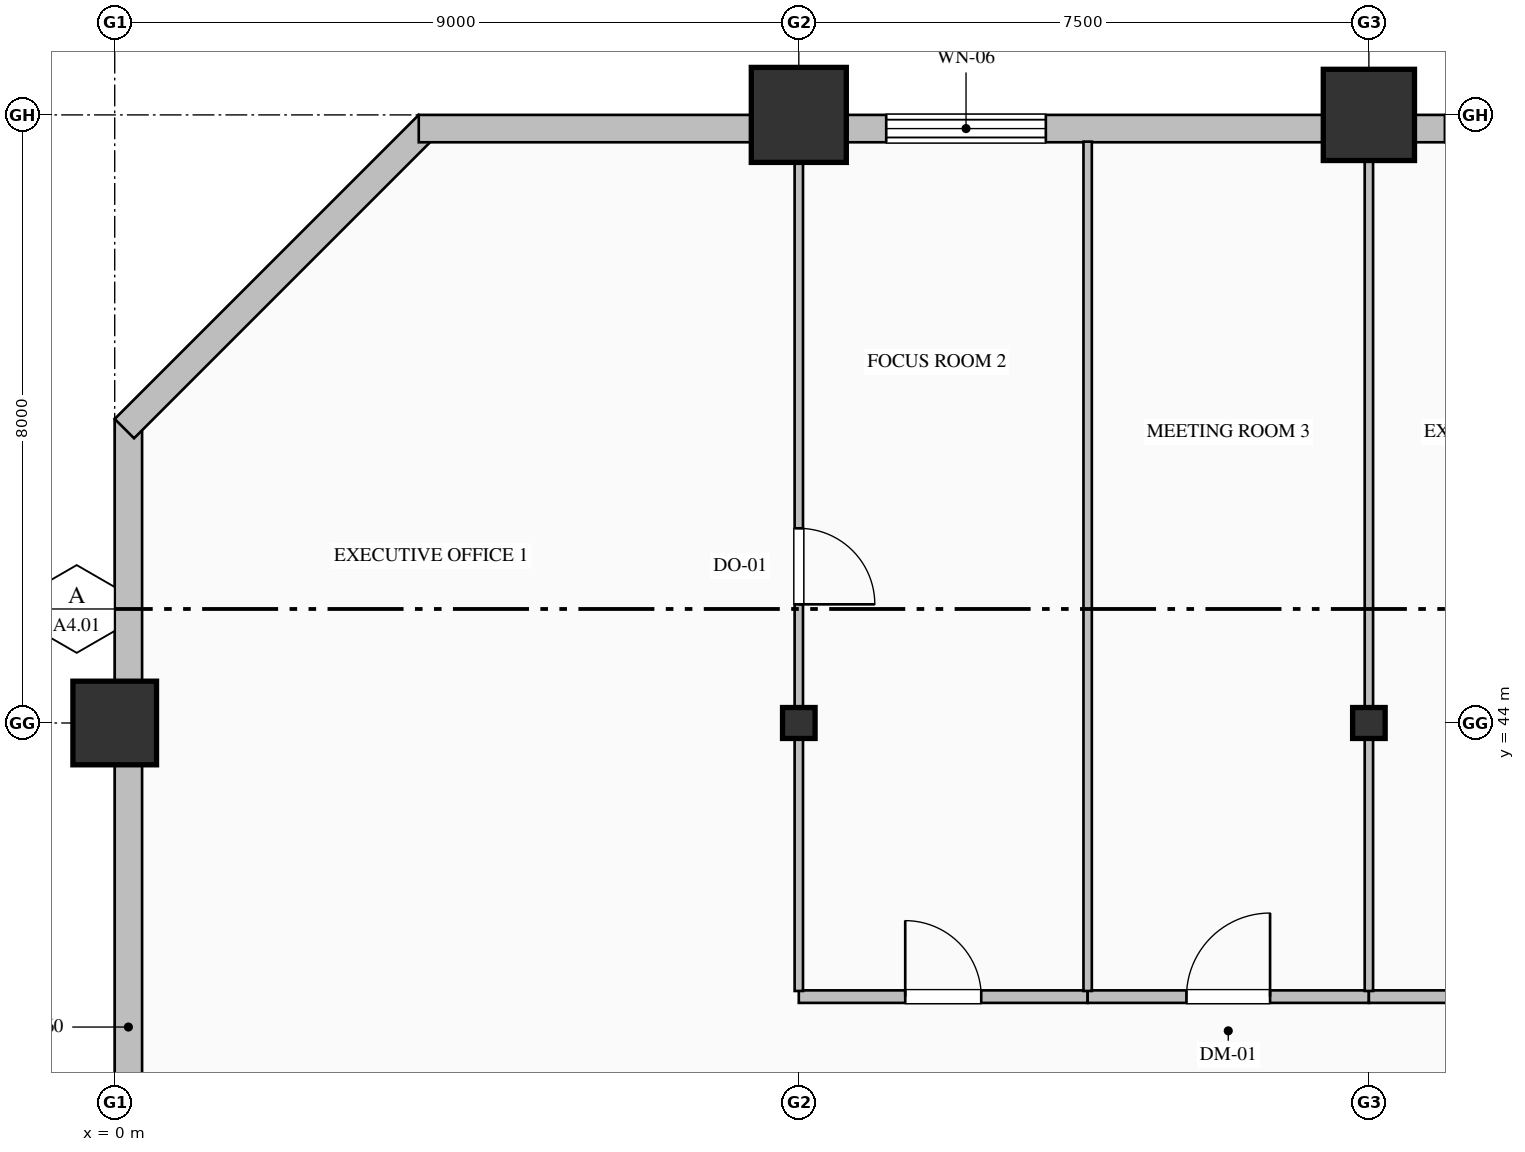
"""IFC4 building model, lengths in metres.
Left out: names, types, materials, properties, quantities, classifications, styles, units other than length and angle.
Written with IfcOpenShell. Run it as: python <this file> out.ifc"""

import sys

from ifc_helpers import new_model, si_unit, direction, frame, frame_2d, origin, origin_2d, place, context, subcontext, project, spatial, rectangle, hollow_rectangle, hollow_circle, i_section, extrude, element, fill, save


model = new_model("IFC4")
c1 = context("Model", 3, precision=1e-05, world=origin(), true_north=direction((0.0, 1.0)))
c2 = subcontext(c1, "Body", "Model", "MODEL_VIEW")
j1 = project(units=[si_unit("LENGTHUNIT", "METRE"), si_unit("PLANEANGLEUNIT", "RADIAN")], contexts=[c1])
p1 = place(None, origin())
s1 = spatial("IfcSite", under=j1, at=p1, CompositionType="ELEMENT")
p2 = place(p1, origin())
s2 = spatial("IfcBuilding", under=s1, at=p2, CompositionType="ELEMENT")
p3 = place(p2, frame((0.0, 0.0, 32.2)))
s3 = spatial("IfcBuildingStorey", under=s2, at=p3, CompositionType="ELEMENT", Elevation=32.2)
p4 = place(p3, frame((0.0, 44.0, 0.0), z_axis=(0.0, 0.0, 1.0), x_axis=(1.0, 0.0, 0.0)))
e1 = element("IfcColumn", 1, at=p4, inside=s3, PredefinedType="COLUMN", context=c2, shape_type="SweptSolid", body=[
    extrude(hollow_rectangle(XDim=1.1, YDim=1.1, WallThickness=0.04, at=origin_2d()), origin(), (0.0, 0.0, 1.0), 4.0),
])
p5 = place(p3, frame((9.0, 44.0, 0.0), z_axis=(0.0, 0.0, 1.0), x_axis=(1.0, 0.0, 0.0)))
e2 = element("IfcColumn", 2, at=p5, inside=s3, PredefinedType="COLUMN", context=c2, shape_type="SweptSolid", body=[
    extrude(i_section(OverallWidth=0.407, OverallDepth=0.428, WebThickness=0.02, FlangeThickness=0.035, FilletRadius=0.022, at=origin_2d()), origin(), (0.0, 0.0, 1.0), 4.0),
])
p6 = place(p3, frame((9.0, 52.0, 0.0), z_axis=(0.0, 0.0, 1.0), x_axis=(1.0, 0.0, 0.0)))
e3 = element("IfcColumn", 3, at=p6, inside=s3, PredefinedType="COLUMN", context=c2, shape_type="SweptSolid", body=[
    extrude(hollow_rectangle(XDim=1.25, YDim=1.25, WallThickness=0.045, at=origin_2d()), origin(), (0.0, 0.0, 1.0), 4.0),
])
p7 = place(p3, frame((16.5, 44.0, 0.0), z_axis=(0.0, 0.0, 1.0), x_axis=(1.0, 0.0, 0.0)))
e4 = element("IfcColumn", 4, at=p7, inside=s3, PredefinedType="COLUMN", context=c2, shape_type="SweptSolid", body=[
    extrude(i_section(OverallWidth=0.407, OverallDepth=0.428, WebThickness=0.02, FlangeThickness=0.035, FilletRadius=0.022, at=origin_2d()), origin(), (0.0, 0.0, 1.0), 4.0),
])
p8 = place(p3, frame((16.5, 52.0, 0.0), z_axis=(0.0, 0.0, 1.0), x_axis=(1.0, 0.0, 0.0)))
e5 = element("IfcColumn", 5, at=p8, inside=s3, PredefinedType="COLUMN", context=c2, shape_type="SweptSolid", body=[
    extrude(hollow_circle(Radius=0.6, WallThickness=0.04, at=origin_2d()), origin(), (0.0, 0.0, 1.0), 4.0),
])
p9 = place(p3, frame((0.18, 32.0, 0.0), z_axis=(0.0, 0.0, 1.0), x_axis=(0.0, 1.0, 0.0)))
e6 = element("IfcWall", 6, at=p9, inside=s3, PredefinedType="SOLIDWALL", context=c2, shape_type="SweptSolid", body=[
    extrude(rectangle(XDim=16.0, YDim=0.36, at=frame_2d((8.0, 0.0))), origin(), (0.0, 0.0, 1.0), 3.25),
])
p10 = place(p3, frame((0.127, 47.873, 0.0), z_axis=(0.0, 0.0, 1.0), x_axis=(0.707106781187, 0.707106781187, 0.0)))
e7 = element("IfcWall", 7, at=p10, inside=s3, PredefinedType="SOLIDWALL", context=c2, shape_type="SweptSolid", body=[
    extrude(rectangle(XDim=5.657, YDim=0.36, at=frame_2d((2.828, 0.0))), origin(), (0.0, 0.0, 1.0), 3.75),
])
p11 = place(p3, frame((4.0, 51.82, 0.0), z_axis=(0.0, 0.0, 1.0), x_axis=(1.0, 0.0, 0.0)))
e8 = element("IfcWall", 8, at=p11, inside=s3, PredefinedType="SOLIDWALL", context=c2, shape_type="SweptSolid", body=[
    extrude(rectangle(XDim=36.52, YDim=0.36, at=frame_2d((18.26, 0.0))), origin(), (0.0, 0.0, 1.0), 3.25),
])
p12 = place(p11, frame((6.15, 0.0, 0.85)))
e9 = element("IfcOpeningElement", 9, at=p12, cuts=e8, PredefinedType="OPENING", context=c2, shape_type="SweptSolid", body=[
    extrude(rectangle(XDim=2.1, YDim=2.05, at=frame_2d((1.05, 1.025))), frame((0.0, 0.19, 0.0), z_axis=(0.0, -1.0, 0.0), x_axis=(1.0, 0.0, 0.0)), (0.0, 0.0, 1.0), 0.38),
])
p13 = place(p11, frame((13.5, 0.0, 0.85)))
e10 = element("IfcOpeningElement", 10, at=p13, cuts=e8, PredefinedType="OPENING", context=c2, shape_type="SweptSolid", body=[
    extrude(rectangle(XDim=1.8, YDim=2.05, at=frame_2d((0.9, 1.025))), frame((0.0, 0.19, 0.0), z_axis=(0.0, -1.0, 0.0), x_axis=(1.0, 0.0, 0.0)), (0.0, 0.0, 1.0), 0.38),
])
p14 = place(p11, frame((16.95, 0.0, 0.85)))
e11 = element("IfcOpeningElement", 11, at=p14, cuts=e8, PredefinedType="OPENING", context=c2, shape_type="SweptSolid", body=[
    extrude(rectangle(XDim=2.1, YDim=2.05, at=frame_2d((1.05, 1.025))), frame((0.0, 0.19, 0.0), z_axis=(0.0, -1.0, 0.0), x_axis=(1.0, 0.0, 0.0)), (0.0, 0.0, 1.0), 0.38),
])
p15 = place(p11, frame((24.3, 0.0, 0.85)))
e12 = element("IfcOpeningElement", 12, at=p15, cuts=e8, PredefinedType="OPENING", context=c2, shape_type="SweptSolid", body=[
    extrude(rectangle(XDim=1.8, YDim=2.05, at=frame_2d((0.9, 1.025))), frame((0.0, 0.19, 0.0), z_axis=(0.0, -1.0, 0.0), x_axis=(1.0, 0.0, 0.0)), (0.0, 0.0, 1.0), 0.38),
])
p16 = place(p3, frame((9.0, 40.4, 0.0), z_axis=(0.0, 0.0, 1.0), x_axis=(1.0, 0.0, 0.0)))
e13 = element("IfcWall", 13, at=p16, inside=s3, PredefinedType="PARTITIONING", context=c2, shape_type="SweptSolid", body=[
    extrude(rectangle(XDim=3.8, YDim=0.165, at=frame_2d((1.9, 0.0))), origin(), (0.0, 0.0, 1.0), 3.75),
])
p17 = place(p16, frame((1.4, 0.0, 0.0)))
e14 = element("IfcOpeningElement", 14, at=p17, cuts=e13, PredefinedType="OPENING", context=c2, shape_type="SweptSolid", body=[
    extrude(rectangle(XDim=1.0, YDim=2.15, at=frame_2d((0.5, 1.075))), frame((0.0, 0.093, 0.0), z_axis=(0.0, -1.0, 0.0), x_axis=(1.0, 0.0, 0.0)), (0.0, 0.0, 1.0), 0.185),
])
p18 = place(p3, frame((12.8, 40.4, 0.0), z_axis=(0.0, 0.0, 1.0), x_axis=(1.0, 0.0, 0.0)))
e15 = element("IfcWall", 15, at=p18, inside=s3, PredefinedType="PARTITIONING", context=c2, shape_type="SweptSolid", body=[
    extrude(rectangle(XDim=3.7, YDim=0.165, at=frame_2d((1.85, 0.0))), origin(), (0.0, 0.0, 1.0), 3.75),
])
p19 = place(p18, frame((1.3, 0.0, 0.0)))
e16 = element("IfcOpeningElement", 16, at=p19, cuts=e15, PredefinedType="OPENING", context=c2, shape_type="SweptSolid", body=[
    extrude(rectangle(XDim=1.1, YDim=2.2, at=frame_2d((0.55, 1.1))), frame((0.0, 0.093, 0.0), z_axis=(0.0, -1.0, 0.0), x_axis=(1.0, 0.0, 0.0)), (0.0, 0.0, 1.0), 0.185),
])
p20 = place(p3, frame((16.5, 40.4, 0.0), z_axis=(0.0, 0.0, 1.0), x_axis=(1.0, 0.0, 0.0)))
e17 = element("IfcWall", 17, at=p20, inside=s3, PredefinedType="PARTITIONING", context=c2, shape_type="SweptSolid", body=[
    extrude(rectangle(XDim=4.0, YDim=0.165, at=frame_2d((2.0, 0.0))), origin(), (0.0, 0.0, 1.0), 3.75),
])
p21 = place(p20, frame((1.5, 0.0, 0.0)))
e18 = element("IfcOpeningElement", 18, at=p21, cuts=e17, PredefinedType="OPENING", context=c2, shape_type="SweptSolid", body=[
    extrude(rectangle(XDim=1.0, YDim=2.15, at=frame_2d((0.5, 1.075))), frame((0.0, 0.093, 0.0), z_axis=(0.0, -1.0, 0.0), x_axis=(1.0, 0.0, 0.0)), (0.0, 0.0, 1.0), 0.185),
])
p22 = place(p3, frame((9.0, 51.648, 0.0), z_axis=(0.0, 0.0, 1.0), x_axis=(0.0, -1.0, 0.0)))
e19 = element("IfcWall", 19, at=p22, inside=s3, PredefinedType="MOVABLE", context=c2, shape_type="SweptSolid", body=[
    extrude(rectangle(XDim=11.173, YDim=0.11, at=frame_2d((5.587, 0.0))), origin(), (0.0, 0.0, 1.0), 3.042),
])
p23 = place(p22, frame((5.087, 0.0, 0.0)))
e20 = element("IfcOpeningElement", 20, at=p23, cuts=e19, PredefinedType="OPENING", context=c2, shape_type="SweptSolid", body=[
    extrude(rectangle(XDim=1.0, YDim=2.15, at=frame_2d((0.5, 1.075))), frame((0.0, 0.065, 0.0), z_axis=(0.0, -1.0, 0.0), x_axis=(1.0, 0.0, 0.0)), (0.0, 0.0, 1.0), 0.13),
])
p24 = place(p3, frame((12.8, 51.648, 0.0), z_axis=(0.0, 0.0, 1.0), x_axis=(0.0, -1.0, 0.0)))
e21 = element("IfcWall", 21, at=p24, inside=s3, PredefinedType="MOVABLE", context=c2, shape_type="SweptSolid", body=[
    extrude(rectangle(XDim=11.173, YDim=0.11, at=frame_2d((5.587, 0.0))), origin(), (0.0, 0.0, 1.0), 3.75),
])
p25 = place(p3, frame((16.5, 51.648, 0.0), z_axis=(0.0, 0.0, 1.0), x_axis=(0.0, -1.0, 0.0)))
e22 = element("IfcWall", 22, at=p25, inside=s3, PredefinedType="MOVABLE", context=c2, shape_type="SweptSolid", body=[
    extrude(rectangle(XDim=11.173, YDim=0.11, at=frame_2d((5.587, 0.0))), origin(), (0.0, 0.0, 1.0), 3.042),
])
p26 = place(p12, origin())
e23 = element("IfcWindow", 23, at=p26, inside=s3, PartitioningType="TRIPLE_PANEL_VERTICAL", PredefinedType="WINDOW", context=c2, shape_type="SweptSolid", body=[
    extrude(rectangle(XDim=2.1, YDim=2.05, at=frame_2d((1.05, 1.025))), frame((0.0, 0.15, 0.0), z_axis=(0.0, -1.0, 0.0), x_axis=(1.0, 0.0, 0.0)), (0.0, 0.0, 1.0), 0.06),
])
fill(e9, e23)
p27 = place(p13, origin())
e24 = element("IfcWindow", 24, at=p27, inside=s3, PartitioningType="TRIPLE_PANEL_VERTICAL", PredefinedType="WINDOW", context=c2, shape_type="SweptSolid", body=[
    extrude(rectangle(XDim=1.8, YDim=2.05, at=frame_2d((0.9, 1.025))), frame((0.0, 0.15, 0.0), z_axis=(0.0, -1.0, 0.0), x_axis=(1.0, 0.0, 0.0)), (0.0, 0.0, 1.0), 0.06),
])
fill(e10, e24)
p28 = place(p23, origin())
e25 = element("IfcDoor", 25, at=p28, inside=s3, OperationType="SINGLE_SWING_RIGHT", PredefinedType="DOOR", context=c2, shape_type="SweptSolid", body=[
    extrude(rectangle(XDim=1.0, YDim=2.15, at=frame_2d((0.5, 1.075))), frame((0.0, 0.025, 0.0), z_axis=(0.0, -1.0, 0.0), x_axis=(1.0, 0.0, 0.0)), (0.0, 0.0, 1.0), 0.05),
])
fill(e20, e25)
p29 = place(p17, origin())
e26 = element("IfcDoor", 26, at=p29, inside=s3, OperationType="SINGLE_SWING_LEFT", PredefinedType="DOOR", context=c2, shape_type="SweptSolid", body=[
    extrude(rectangle(XDim=1.0, YDim=2.15, at=frame_2d((0.5, 1.075))), frame((0.0, 0.025, 0.0), z_axis=(0.0, -1.0, 0.0), x_axis=(1.0, 0.0, 0.0)), (0.0, 0.0, 1.0), 0.05),
])
fill(e14, e26)
p30 = place(p19, origin())
e27 = element("IfcDoor", 27, at=p30, inside=s3, OperationType="SINGLE_SWING_RIGHT", PredefinedType="DOOR", context=c2, shape_type="SweptSolid", body=[
    extrude(rectangle(XDim=1.1, YDim=2.2, at=frame_2d((0.55, 1.1))), frame((0.0, 0.025, 0.0), z_axis=(0.0, -1.0, 0.0), x_axis=(1.0, 0.0, 0.0)), (0.0, 0.0, 1.0), 0.05),
])
fill(e16, e27)
save(model, sys.argv[1])
